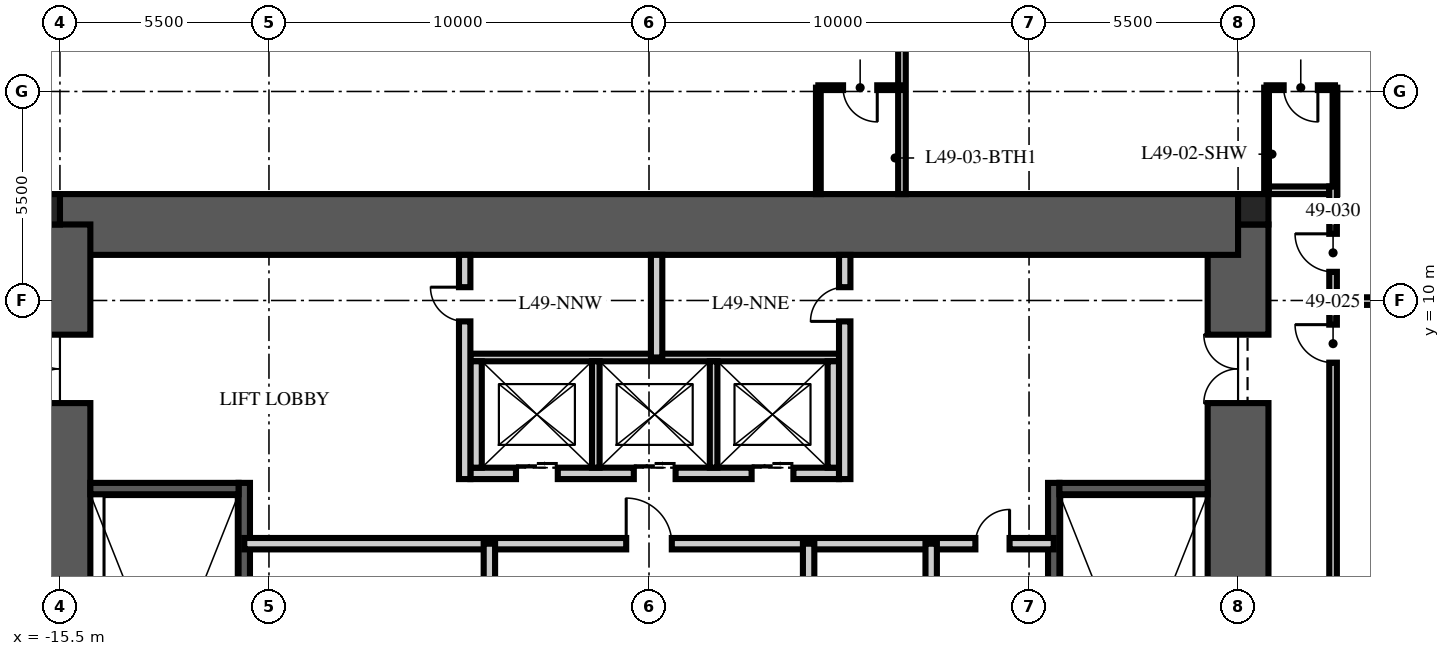
"""IFC4 building model, lengths in metres.
Left out: names, types, materials, properties, quantities, classifications, styles, units other than length and angle.
Written with IfcOpenShell. Run it as: python <this file> out.ifc"""

import sys

from ifc_helpers import new_model, si_unit, direction, frame, frame_2d, origin, origin_2d, place, context, subcontext, project, spatial, rectangle, extrude, element, fill, save


model = new_model("IFC4")
c1 = context("Model", 3, precision=1e-05, world=origin(), true_north=direction((0.0, 1.0)))
c2 = subcontext(c1, "Body", "Model", "MODEL_VIEW")
j1 = project(units=[si_unit("LENGTHUNIT", "METRE"), si_unit("PLANEANGLEUNIT", "RADIAN")], contexts=[c1])
p1 = place(None, origin())
s1 = spatial("IfcSite", under=j1, at=p1, CompositionType="ELEMENT")
p2 = place(p1, origin())
s2 = spatial("IfcBuilding", under=s1, at=p2, CompositionType="ELEMENT")
p3 = place(p2, frame((0.0, 0.0, 199.5)))
s3 = spatial("IfcBuildingStorey", under=s2, at=p3, CompositionType="ELEMENT", Elevation=199.5)
p4 = place(p3, frame((15.5, -12.0, -0.25), z_axis=(0.0, 0.0, 1.0), x_axis=(0.0, 1.0, 0.0)))
e1 = element("IfcWall", 1, at=p4, inside=s3, PredefinedType="SHEAR", context=c2, shape_type="SweptSolid", body=[
    extrude(rectangle(XDim=24.0, YDim=1.6, at=frame_2d((12.0, 0.0))), origin(), (0.0, 0.0, 1.0), 3.75),
])
p5 = place(p4, frame((3.2, 0.0, 0.25)))
e2 = element("IfcOpeningElement", 2, at=p5, cuts=e1, PredefinedType="OPENING", context=c2, shape_type="SweptSolid", body=[
    extrude(rectangle(XDim=1.2, YDim=2.1, at=frame_2d((0.6, 1.05))), frame((0.0, 0.81, 0.0), z_axis=(0.0, -1.0, 0.0), x_axis=(1.0, 0.0, 0.0)), (0.0, 0.0, 1.0), 1.62),
])
p6 = place(p4, frame((19.3, 0.0, 0.25)))
e3 = element("IfcOpeningElement", 3, at=p6, cuts=e1, PredefinedType="OPENING", context=c2, shape_type="SweptSolid", body=[
    extrude(rectangle(XDim=1.8, YDim=2.1, at=frame_2d((0.9, 1.05))), frame((0.0, 0.81, 0.0), z_axis=(0.0, -1.0, 0.0), x_axis=(1.0, 0.0, 0.0)), (0.0, 0.0, 1.0), 1.62),
])
p7 = place(p3, frame((-15.5, 12.0, -0.25), z_axis=(0.0, 0.0, 1.0), x_axis=(1.0, 0.0, 0.0)))
e4 = element("IfcWall", 4, at=p7, inside=s3, PredefinedType="SHEAR", context=c2, shape_type="SweptSolid", body=[
    extrude(rectangle(XDim=31.0, YDim=1.6, at=frame_2d((15.5, 0.0))), origin(), (0.0, 0.0, 1.0), 3.75),
])
p8 = place(p3, frame((-15.5, -12.0, -0.25), z_axis=(0.0, 0.0, 1.0), x_axis=(0.0, 1.0, 0.0)))
e5 = element("IfcWall", 5, at=p8, inside=s3, PredefinedType="SHEAR", context=c2, shape_type="SweptSolid", body=[
    extrude(rectangle(XDim=24.0, YDim=1.6, at=frame_2d((12.0, 0.0))), origin(), (0.0, 0.0, 1.0), 3.75),
])
p9 = place(p8, frame((3.2, 0.0, 0.25)))
e6 = element("IfcOpeningElement", 6, at=p9, cuts=e5, PredefinedType="OPENING", context=c2, shape_type="SweptSolid", body=[
    extrude(rectangle(XDim=1.2, YDim=2.1, at=frame_2d((0.6, 1.05))), frame((0.0, 0.81, 0.0), z_axis=(0.0, -1.0, 0.0), x_axis=(1.0, 0.0, 0.0)), (0.0, 0.0, 1.0), 1.62),
])
p10 = place(p8, frame((19.3, 0.0, 0.25)))
e7 = element("IfcOpeningElement", 7, at=p10, cuts=e5, PredefinedType="OPENING", context=c2, shape_type="SweptSolid", body=[
    extrude(rectangle(XDim=1.8, YDim=2.1, at=frame_2d((0.9, 1.05))), frame((0.0, 0.81, 0.0), z_axis=(0.0, -1.0, 0.0), x_axis=(1.0, 0.0, 0.0)), (0.0, 0.0, 1.0), 1.62),
])
for number, where, z_axis, x_axis in (
    (8, (15.9, 12.4, -0.25), (0.0, 0.0, 1.0), (1.0, 0.0, 0.0)),
    (9, (-15.9, 12.4, -0.25), (0.0, 0.0, 1.0), (1.0, 0.0, 0.0)),
):
    element("IfcColumn", number, at=place(p3, frame(where, z_axis=z_axis, x_axis=x_axis)), inside=s3, PredefinedType="COLUMN", context=c2, shape_type="SweptSolid", body=[
        extrude(rectangle(XDim=0.8, YDim=0.8, at=origin_2d()), origin(), (0.0, 0.0, 1.0), 3.75),
    ])
p11 = place(p3, frame((-10.65, -4.9, 0.0), z_axis=(0.0, 0.0, 1.0), x_axis=(0.0, 1.0, 0.0)))
e10 = element("IfcWall", 10, at=p11, inside=s3, PredefinedType="SOLIDWALL", context=c2, shape_type="SweptSolid", body=[
    extrude(rectangle(XDim=10.1, YDim=0.3, at=frame_2d((5.05, 0.0))), origin(), (0.0, 0.0, 1.0), 3.5),
])
p12 = place(p3, frame((-14.7, 5.05, 0.0), z_axis=(0.0, 0.0, 1.0), x_axis=(1.0, 0.0, 0.0)))
e11 = element("IfcWall", 11, at=p12, inside=s3, PredefinedType="SOLIDWALL", context=c2, shape_type="SweptSolid", body=[
    extrude(rectangle(XDim=3.9, YDim=0.3, at=frame_2d((1.95, 0.0))), origin(), (0.0, 0.0, 1.0), 3.5),
])
p13 = place(p3, frame((10.65, -4.9, 0.0), z_axis=(0.0, 0.0, 1.0), x_axis=(0.0, 1.0, 0.0)))
e12 = element("IfcWall", 12, at=p13, inside=s3, PredefinedType="SOLIDWALL", context=c2, shape_type="SweptSolid", body=[
    extrude(rectangle(XDim=10.1, YDim=0.3, at=frame_2d((5.05, 0.0))), origin(), (0.0, 0.0, 1.0), 3.5),
])
p14 = place(p3, frame((14.7, 5.05, 0.0), z_axis=(0.0, 0.0, 1.0), x_axis=(-1.0, 0.0, 0.0)))
e13 = element("IfcWall", 13, at=p14, inside=s3, PredefinedType="SOLIDWALL", context=c2, shape_type="SweptSolid", body=[
    extrude(rectangle(XDim=3.9, YDim=0.3, at=frame_2d((1.95, 0.0))), origin(), (0.0, 0.0, 1.0), 3.5),
])
p15 = place(p3, frame((-4.7, 5.45, 0.0), z_axis=(0.0, 0.0, 1.0), x_axis=(1.0, 0.0, 0.0)))
e14 = element("IfcWall", 14, at=p15, inside=s3, PredefinedType="PARTITIONING", context=c2, shape_type="SweptSolid", body=[
    extrude(rectangle(XDim=9.7, YDim=0.3, at=frame_2d((4.85, 0.0))), origin(), (0.0, 0.0, 1.0), 3.5),
])
p16 = place(p15, frame((1.2, 0.0, 0.0)))
e15 = element("IfcOpeningElement", 15, at=p16, cuts=e14, PredefinedType="OPENING", context=c2, shape_type="SweptSolid", body=[
    extrude(rectangle(XDim=1.1, YDim=2.1, at=frame_2d((0.55, 1.05))), frame((0.0, 0.16, 0.0), z_axis=(0.0, -1.0, 0.0), x_axis=(1.0, 0.0, 0.0)), (0.0, 0.0, 1.0), 0.32),
])
p17 = place(p15, frame((4.3, 0.0, 0.0)))
e16 = element("IfcOpeningElement", 16, at=p17, cuts=e14, PredefinedType="OPENING", context=c2, shape_type="SweptSolid", body=[
    extrude(rectangle(XDim=1.1, YDim=2.1, at=frame_2d((0.55, 1.05))), frame((0.0, 0.16, 0.0), z_axis=(0.0, -1.0, 0.0), x_axis=(1.0, 0.0, 0.0)), (0.0, 0.0, 1.0), 0.32),
])
p18 = place(p15, frame((7.4, 0.0, 0.0)))
e17 = element("IfcOpeningElement", 17, at=p18, cuts=e14, PredefinedType="OPENING", context=c2, shape_type="SweptSolid", body=[
    extrude(rectangle(XDim=1.1, YDim=2.1, at=frame_2d((0.55, 1.05))), frame((0.0, 0.16, 0.0), z_axis=(0.0, -1.0, 0.0), x_axis=(1.0, 0.0, 0.0)), (0.0, 0.0, 1.0), 0.32),
])
p19 = place(p3, frame((-4.7, 8.5, 0.0), z_axis=(0.0, 0.0, 1.0), x_axis=(1.0, 0.0, 0.0)))
e18 = element("IfcWall", 18, at=p19, inside=s3, PredefinedType="PARTITIONING", context=c2, shape_type="SweptSolid", body=[
    extrude(rectangle(XDim=9.7, YDim=0.2, at=frame_2d((4.85, 0.0))), origin(), (0.0, 0.0, 1.0), 3.5),
])
for number, where, z_axis, x_axis in (
    (19, (-4.55, 5.6, 0.0), (0.0, 0.0, 1.0), (0.0, 1.0, 0.0)),
    (20, (4.85, 5.6, 0.0), (0.0, 0.0, 1.0), (0.0, 1.0, 0.0)),
):
    element("IfcWall", number, at=place(p3, frame(where, z_axis=z_axis, x_axis=x_axis)), inside=s3, PredefinedType="PARTITIONING", context=c2, shape_type="SweptSolid", body=[
        extrude(rectangle(XDim=2.8, YDim=0.3, at=frame_2d((1.4, 0.0))), origin(), (0.0, 0.0, 1.0), 3.5),
    ])
for number, where, z_axis, x_axis in (
    (21, (-1.4, 5.6, 0.0), (0.0, 0.0, 1.0), (0.0, 1.0, 0.0)),
    (22, (1.7, 5.6, 0.0), (0.0, 0.0, 1.0), (0.0, 1.0, 0.0)),
):
    element("IfcWall", number, at=place(p3, frame(where, z_axis=z_axis, x_axis=x_axis)), inside=s3, PredefinedType="PARTITIONING", context=c2, shape_type="SweptSolid", body=[
        extrude(rectangle(XDim=2.8, YDim=0.2, at=frame_2d((1.4, 0.0))), origin(), (0.0, 0.0, 1.0), 3.5),
    ])
p20 = place(p3, frame((-10.65, 3.6, 0.0), z_axis=(0.0, 0.0, 1.0), x_axis=(1.0, 0.0, 0.0)))
e23 = element("IfcWall", 23, at=p20, inside=s3, PredefinedType="PARTITIONING", context=c2, shape_type="SweptSolid", body=[
    extrude(rectangle(XDim=21.3, YDim=0.3, at=frame_2d((10.65, 0.0))), origin(), (0.0, 0.0, 1.0), 3.5),
])
p21 = place(p20, frame((10.05, 0.0, 0.0)))
e24 = element("IfcOpeningElement", 24, at=p21, cuts=e23, PredefinedType="OPENING", context=c2, shape_type="SweptSolid", body=[
    extrude(rectangle(XDim=1.2, YDim=2.1, at=frame_2d((0.6, 1.05))), frame((0.0, 0.16, 0.0), z_axis=(0.0, -1.0, 0.0), x_axis=(1.0, 0.0, 0.0)), (0.0, 0.0, 1.0), 0.32),
])
p22 = place(p20, frame((19.238, 0.0, 0.0)))
e25 = element("IfcOpeningElement", 25, at=p22, cuts=e23, PredefinedType="OPENING", context=c2, shape_type="SweptSolid", body=[
    extrude(rectangle(XDim=0.9, YDim=2.1, at=frame_2d((0.45, 1.05))), frame((0.0, 0.16, 0.0), z_axis=(0.0, -1.0, 0.0), x_axis=(1.0, 0.0, 0.0)), (0.0, 0.0, 1.0), 0.32),
])
p23 = place(p3, frame((-4.2, -6.65, 0.0), z_axis=(0.0, 0.0, 1.0), x_axis=(0.0, 1.0, 0.0)))
e26 = element("IfcWall", 26, at=p23, inside=s3, PredefinedType="PARTITIONING", context=c2, shape_type="SweptSolid", body=[
    extrude(rectangle(XDim=10.25, YDim=0.3, at=frame_2d((5.125, 0.0))), origin(), (0.0, 0.0, 1.0), 3.5),
])
p24 = place(p23, frame((0.787, 0.0, 0.0)))
e27 = element("IfcOpeningElement", 27, at=p24, cuts=e26, PredefinedType="OPENING", context=c2, shape_type="SweptSolid", body=[
    extrude(rectangle(XDim=0.9, YDim=2.1, at=frame_2d((0.45, 1.05))), frame((0.0, 0.16, 0.0), z_axis=(0.0, -1.0, 0.0), x_axis=(1.0, 0.0, 0.0)), (0.0, 0.0, 1.0), 0.32),
])
p25 = place(p23, frame((5.912, 0.0, 0.0)))
e28 = element("IfcOpeningElement", 28, at=p25, cuts=e26, PredefinedType="OPENING", context=c2, shape_type="SweptSolid", body=[
    extrude(rectangle(XDim=0.9, YDim=2.1, at=frame_2d((0.45, 1.05))), frame((0.0, 0.16, 0.0), z_axis=(0.0, -1.0, 0.0), x_axis=(1.0, 0.0, 0.0)), (0.0, 0.0, 1.0), 0.32),
])
p26 = place(p3, frame((4.2, -6.65, 0.0), z_axis=(0.0, 0.0, 1.0), x_axis=(0.0, 1.0, 0.0)))
e29 = element("IfcWall", 29, at=p26, inside=s3, PredefinedType="PARTITIONING", context=c2, shape_type="SweptSolid", body=[
    extrude(rectangle(XDim=10.25, YDim=0.3, at=frame_2d((5.125, 0.0))), origin(), (0.0, 0.0, 1.0), 3.5),
])
p27 = place(p26, frame((2.15, 0.0, 0.0)))
e30 = element("IfcOpeningElement", 30, at=p27, cuts=e29, PredefinedType="OPENING", context=c2, shape_type="SweptSolid", body=[
    extrude(rectangle(XDim=0.9, YDim=2.1, at=frame_2d((0.45, 1.05))), frame((0.0, 0.16, 0.0), z_axis=(0.0, -1.0, 0.0), x_axis=(1.0, 0.0, 0.0)), (0.0, 0.0, 1.0), 0.32),
])
p28 = place(p26, frame((7.275, 0.0, 0.0)))
e31 = element("IfcOpeningElement", 31, at=p28, cuts=e29, PredefinedType="OPENING", context=c2, shape_type="SweptSolid", body=[
    extrude(rectangle(XDim=0.9, YDim=2.1, at=frame_2d((0.45, 1.05))), frame((0.0, 0.16, 0.0), z_axis=(0.0, -1.0, 0.0), x_axis=(1.0, 0.0, 0.0)), (0.0, 0.0, 1.0), 0.32),
])
p29 = place(p3, frame((7.425, -1.45, 0.0), z_axis=(0.0, 0.0, 1.0), x_axis=(0.0, 1.0, 0.0)))
e32 = element("IfcWall", 32, at=p29, inside=s3, PredefinedType="PARTITIONING", context=c2, shape_type="SweptSolid", body=[
    extrude(rectangle(XDim=5.05, YDim=0.3, at=frame_2d((2.525, 0.0))), origin(), (0.0, 0.0, 1.0), 3.5),
])
p30 = place(p3, frame((-4.85, 5.3, 0.0), z_axis=(0.0, 0.0, 1.0), x_axis=(0.0, 1.0, 0.0)))
e33 = element("IfcWall", 33, at=p30, inside=s3, PredefinedType="PARTITIONING", context=c2, shape_type="SweptSolid", body=[
    extrude(rectangle(XDim=5.9, YDim=0.3, at=frame_2d((2.95, 0.0))), origin(), (0.0, 0.0, 1.0), 3.5),
])
p31 = place(p30, frame((4.15, 0.0, 0.0)))
e34 = element("IfcOpeningElement", 34, at=p31, cuts=e33, PredefinedType="OPENING", context=c2, shape_type="SweptSolid", body=[
    extrude(rectangle(XDim=0.9, YDim=2.1, at=frame_2d((0.45, 1.05))), frame((0.0, 0.16, 0.0), z_axis=(0.0, -1.0, 0.0), x_axis=(1.0, 0.0, 0.0)), (0.0, 0.0, 1.0), 0.32),
])
p32 = place(p3, frame((5.15, 5.3, 0.0), z_axis=(0.0, 0.0, 1.0), x_axis=(0.0, 1.0, 0.0)))
e35 = element("IfcWall", 35, at=p32, inside=s3, PredefinedType="PARTITIONING", context=c2, shape_type="SweptSolid", body=[
    extrude(rectangle(XDim=5.9, YDim=0.3, at=frame_2d((2.95, 0.0))), origin(), (0.0, 0.0, 1.0), 3.5),
])
p33 = place(p32, frame((4.15, 0.0, 0.0)))
e36 = element("IfcOpeningElement", 36, at=p33, cuts=e35, PredefinedType="OPENING", context=c2, shape_type="SweptSolid", body=[
    extrude(rectangle(XDim=0.9, YDim=2.1, at=frame_2d((0.45, 1.05))), frame((0.0, 0.16, 0.0), z_axis=(0.0, -1.0, 0.0), x_axis=(1.0, 0.0, 0.0)), (0.0, 0.0, 1.0), 0.32),
])
p34 = place(p3, frame((0.2, 8.5, 0.0), z_axis=(0.0, 0.0, 1.0), x_axis=(0.0, 1.0, 0.0)))
e37 = element("IfcWall", 37, at=p34, inside=s3, PredefinedType="PARTITIONING", context=c2, shape_type="SweptSolid", body=[
    extrude(rectangle(XDim=2.7, YDim=0.3, at=frame_2d((1.35, 0.0))), origin(), (0.0, 0.0, 1.0), 3.5),
])
p35 = place(p3, frame((16.3, 12.9, 0.0), z_axis=(0.0, 0.0, 1.0), x_axis=(1.0, 0.0, 0.0)))
e38 = element("IfcWall", 38, at=p35, inside=s3, PredefinedType="PARTITIONING", context=c2, shape_type="SweptSolid", body=[
    extrude(rectangle(XDim=1.6, YDim=0.2, at=frame_2d((0.8, 0.0))), origin(), (0.0, 0.0, 1.0), 2.3),
])
p36 = place(p3, frame((18.1, 9.984, 0.0), z_axis=(0.0, 0.0, 1.0), x_axis=(1.0, 0.0, 0.0)))
e39 = element("IfcWall", 39, at=p36, inside=s3, PredefinedType="PARTITIONING", context=c2, shape_type="SweptSolid", body=[
    extrude(rectangle(XDim=8.35, YDim=0.2, at=frame_2d((4.175, 0.0))), origin(), (0.0, 0.0, 1.0), 2.91),
])
p37 = place(p3, frame((6.656, 12.8, 0.0), z_axis=(0.0, 0.0, 1.0), x_axis=(0.0, 1.0, 0.0)))
e40 = element("IfcWall", 40, at=p37, inside=s3, PredefinedType="PARTITIONING", context=c2, shape_type="SweptSolid", body=[
    extrude(rectangle(XDim=13.65, YDim=0.2, at=frame_2d((6.825, 0.0))), origin(), (0.0, 0.0, 1.0), 2.91),
])
p38 = place(p3, frame((18.05, 15.6, 0.0), z_axis=(0.0, 0.0, 1.0), x_axis=(-1.0, 0.0, 0.0)))
e41 = element("IfcWall", 41, at=p38, inside=s3, PredefinedType="PARTITIONING", context=c2, shape_type="SweptSolid", body=[
    extrude(rectangle(XDim=1.8, YDim=0.125, at=frame_2d((0.9, 0.0))), origin(), (0.0, 0.0, 1.0), 2.3),
])
p39 = place(p38, frame((0.45, 0.0, 0.0)))
e42 = element("IfcOpeningElement", 42, at=p39, cuts=e41, PredefinedType="OPENING", context=c2, shape_type="SweptSolid", body=[
    extrude(rectangle(XDim=0.9, YDim=2.1, at=frame_2d((0.45, 1.05))), frame((0.0, 0.073, 0.0), z_axis=(0.0, -1.0, 0.0), x_axis=(1.0, 0.0, 0.0)), (0.0, 0.0, 1.0), 0.145),
])
for number, where, z_axis, x_axis in (
    (43, (18.05, 12.8, 0.0), (0.0, 0.0, 1.0), (0.0, 1.0, 0.0)),
    (44, (16.25, 12.8, 0.0), (0.0, 0.0, 1.0), (0.0, 1.0, 0.0)),
):
    element("IfcWall", number, at=place(p3, frame(where, z_axis=z_axis, x_axis=x_axis)), inside=s3, PredefinedType="PARTITIONING", context=c2, shape_type="SweptSolid", body=[
        extrude(rectangle(XDim=2.8, YDim=0.125, at=frame_2d((1.4, 0.0))), origin(), (0.0, 0.0, 1.0), 2.3),
    ])
p40 = place(p3, frame((6.656, 15.6, 0.0), z_axis=(0.0, 0.0, 1.0), x_axis=(-1.0, 0.0, 0.0)))
e45 = element("IfcWall", 45, at=p40, inside=s3, PredefinedType="PARTITIONING", context=c2, shape_type="SweptSolid", body=[
    extrude(rectangle(XDim=2.2, YDim=0.125, at=frame_2d((1.1, 0.0))), origin(), (0.0, 0.0, 1.0), 3.5),
])
p41 = place(p40, frame((0.65, 0.0, 0.0)))
e46 = element("IfcOpeningElement", 46, at=p41, cuts=e45, PredefinedType="OPENING", context=c2, shape_type="SweptSolid", body=[
    extrude(rectangle(XDim=0.9, YDim=2.1, at=frame_2d((0.45, 1.05))), frame((0.0, 0.073, 0.0), z_axis=(0.0, -1.0, 0.0), x_axis=(1.0, 0.0, 0.0)), (0.0, 0.0, 1.0), 0.145),
])
p42 = place(p3, frame((4.456, 12.8, 0.0), z_axis=(0.0, 0.0, 1.0), x_axis=(0.0, 1.0, 0.0)))
e47 = element("IfcWall", 47, at=p42, inside=s3, PredefinedType="PARTITIONING", context=c2, shape_type="SweptSolid", body=[
    extrude(rectangle(XDim=2.8, YDim=0.125, at=frame_2d((1.4, 0.0))), origin(), (0.0, 0.0, 1.0), 3.5),
])
p43 = place(p3, frame((18.0, -13.0, 0.0), z_axis=(0.0, 0.0, 1.0), x_axis=(0.0, 1.0, 0.0)))
e48 = element("IfcWall", 48, at=p43, inside=s3, PredefinedType="PARTITIONING", context=c2, shape_type="SweptSolid", body=[
    extrude(rectangle(XDim=26.0, YDim=0.2, at=frame_2d((13.0, 0.0))), origin(), (0.0, 0.0, 1.0), 2.6),
])
p44 = place(p43, frame((21.364, 0.0, 0.0)))
e49 = element("IfcOpeningElement", 49, at=p44, cuts=e48, PredefinedType="OPENING", context=c2, shape_type="SweptSolid", body=[
    extrude(rectangle(XDim=1.0, YDim=2.2, at=frame_2d((0.5, 1.1))), frame((0.0, 0.11, 0.0), z_axis=(0.0, -1.0, 0.0), x_axis=(1.0, 0.0, 0.0)), (0.0, 0.0, 1.0), 0.22),
])
p45 = place(p43, frame((23.754, 0.0, 0.0)))
e50 = element("IfcOpeningElement", 50, at=p45, cuts=e48, PredefinedType="OPENING", context=c2, shape_type="SweptSolid", body=[
    extrude(rectangle(XDim=1.0, YDim=2.2, at=frame_2d((0.5, 1.1))), frame((0.0, 0.11, 0.0), z_axis=(0.0, -1.0, 0.0), x_axis=(1.0, 0.0, 0.0)), (0.0, 0.0, 1.0), 0.22),
])
p46 = place(p43, frame((4.6, 0.0, 0.0)))
e51 = element("IfcOpeningElement", 51, at=p46, cuts=e48, PredefinedType="OPENING", context=c2, shape_type="SweptSolid", body=[
    extrude(rectangle(XDim=1.0, YDim=2.2, at=frame_2d((0.5, 1.1))), frame((0.0, 0.11, 0.0), z_axis=(0.0, -1.0, 0.0), x_axis=(1.0, 0.0, 0.0)), (0.0, 0.0, 1.0), 0.22),
])
p47 = place(p10, origin())
e52 = element("IfcDoor", 52, at=p47, inside=s3, OperationType="DOUBLE_DOOR_SINGLE_SWING", PredefinedType="DOOR", context=c2, shape_type="SweptSolid", body=[
    extrude(rectangle(XDim=1.8, YDim=2.1, at=frame_2d((0.9, 1.05))), frame((0.0, 0.025, 0.0), z_axis=(0.0, -1.0, 0.0), x_axis=(1.0, 0.0, 0.0)), (0.0, 0.0, 1.0), 0.05),
])
fill(e7, e52)
p48 = place(p6, origin())
e53 = element("IfcDoor", 53, at=p48, inside=s3, OperationType="DOUBLE_DOOR_SINGLE_SWING", PredefinedType="DOOR", context=c2, shape_type="SweptSolid", body=[
    extrude(rectangle(XDim=1.8, YDim=2.1, at=frame_2d((0.9, 1.05))), frame((0.0, 0.025, 0.0), z_axis=(0.0, -1.0, 0.0), x_axis=(1.0, 0.0, 0.0)), (0.0, 0.0, 1.0), 0.05),
])
fill(e3, e53)
p49 = place(p16, origin())
e54 = element("IfcDoor", 54, at=p49, inside=s3, OperationType="DOUBLE_DOOR_SLIDING", PredefinedType="DOOR", context=c2, shape_type="SweptSolid", body=[
    extrude(rectangle(XDim=1.1, YDim=2.1, at=frame_2d((0.55, 1.05))), frame((0.0, 0.025, 0.0), z_axis=(0.0, -1.0, 0.0), x_axis=(1.0, 0.0, 0.0)), (0.0, 0.0, 1.0), 0.05),
])
fill(e15, e54)
p50 = place(p17, origin())
e55 = element("IfcDoor", 55, at=p50, inside=s3, OperationType="DOUBLE_DOOR_SLIDING", PredefinedType="DOOR", context=c2, shape_type="SweptSolid", body=[
    extrude(rectangle(XDim=1.1, YDim=2.1, at=frame_2d((0.55, 1.05))), frame((0.0, 0.025, 0.0), z_axis=(0.0, -1.0, 0.0), x_axis=(1.0, 0.0, 0.0)), (0.0, 0.0, 1.0), 0.05),
])
fill(e16, e55)
p51 = place(p18, origin())
e56 = element("IfcDoor", 56, at=p51, inside=s3, OperationType="DOUBLE_DOOR_SLIDING", PredefinedType="DOOR", context=c2, shape_type="SweptSolid", body=[
    extrude(rectangle(XDim=1.1, YDim=2.1, at=frame_2d((0.55, 1.05))), frame((0.0, 0.025, 0.0), z_axis=(0.0, -1.0, 0.0), x_axis=(1.0, 0.0, 0.0)), (0.0, 0.0, 1.0), 0.05),
])
fill(e17, e56)
p52 = place(p21, origin())
e57 = element("IfcDoor", 57, at=p52, inside=s3, OperationType="SINGLE_SWING_LEFT", PredefinedType="DOOR", context=c2, shape_type="SweptSolid", body=[
    extrude(rectangle(XDim=1.2, YDim=2.1, at=frame_2d((0.6, 1.05))), frame((0.0, 0.025, 0.0), z_axis=(0.0, -1.0, 0.0), x_axis=(1.0, 0.0, 0.0)), (0.0, 0.0, 1.0), 0.05),
])
fill(e24, e57)
p53 = place(p22, origin())
e58 = element("IfcDoor", 58, at=p53, inside=s3, OperationType="SINGLE_SWING_RIGHT", PredefinedType="DOOR", context=c2, shape_type="SweptSolid", body=[
    extrude(rectangle(XDim=0.9, YDim=2.1, at=frame_2d((0.45, 1.05))), frame((0.0, 0.025, 0.0), z_axis=(0.0, -1.0, 0.0), x_axis=(1.0, 0.0, 0.0)), (0.0, 0.0, 1.0), 0.05),
])
fill(e25, e58)
p54 = place(p31, origin())
e59 = element("IfcDoor", 59, at=p54, inside=s3, OperationType="SINGLE_SWING_RIGHT", PredefinedType="DOOR", context=c2, shape_type="SweptSolid", body=[
    extrude(rectangle(XDim=0.9, YDim=2.1, at=frame_2d((0.45, 1.05))), frame((0.0, 0.025, 0.0), z_axis=(0.0, -1.0, 0.0), x_axis=(1.0, 0.0, 0.0)), (0.0, 0.0, 1.0), 0.05),
])
fill(e34, e59)
p55 = place(p33, origin())
e60 = element("IfcDoor", 60, at=p55, inside=s3, OperationType="SINGLE_SWING_LEFT", PredefinedType="DOOR", context=c2, shape_type="SweptSolid", body=[
    extrude(rectangle(XDim=0.9, YDim=2.1, at=frame_2d((0.45, 1.05))), frame((0.0, 0.025, 0.0), z_axis=(0.0, -1.0, 0.0), x_axis=(1.0, 0.0, 0.0)), (0.0, 0.0, 1.0), 0.05),
])
fill(e36, e60)
p56 = place(p44, origin())
e61 = element("IfcDoor", 61, at=p56, inside=s3, OperationType="SINGLE_SWING_RIGHT", PredefinedType="DOOR", context=c2, shape_type="SweptSolid", body=[
    extrude(rectangle(XDim=1.0, YDim=2.2, at=frame_2d((0.5, 1.1))), frame((0.0, 0.025, 0.0), z_axis=(0.0, -1.0, 0.0), x_axis=(1.0, 0.0, 0.0)), (0.0, 0.0, 1.0), 0.05),
])
fill(e49, e61)
p57 = place(p39, origin())
e62 = element("IfcDoor", 62, at=p57, inside=s3, OperationType="SINGLE_SWING_LEFT", PredefinedType="DOOR", context=c2, shape_type="SweptSolid", body=[
    extrude(rectangle(XDim=0.9, YDim=2.1, at=frame_2d((0.45, 1.05))), frame((0.0, 0.025, 0.0), z_axis=(0.0, -1.0, 0.0), x_axis=(1.0, 0.0, 0.0)), (0.0, 0.0, 1.0), 0.05),
])
fill(e42, e62)
p58 = place(p45, origin())
e63 = element("IfcDoor", 63, at=p58, inside=s3, OperationType="SINGLE_SWING_RIGHT", PredefinedType="DOOR", context=c2, shape_type="SweptSolid", body=[
    extrude(rectangle(XDim=1.0, YDim=2.2, at=frame_2d((0.5, 1.1))), frame((0.0, 0.025, 0.0), z_axis=(0.0, -1.0, 0.0), x_axis=(1.0, 0.0, 0.0)), (0.0, 0.0, 1.0), 0.05),
])
fill(e50, e63)
p59 = place(p41, origin())
e64 = element("IfcDoor", 64, at=p59, inside=s3, OperationType="SINGLE_SWING_LEFT", PredefinedType="DOOR", context=c2, shape_type="SweptSolid", body=[
    extrude(rectangle(XDim=0.9, YDim=2.1, at=frame_2d((0.45, 1.05))), frame((0.0, 0.025, 0.0), z_axis=(0.0, -1.0, 0.0), x_axis=(1.0, 0.0, 0.0)), (0.0, 0.0, 1.0), 0.05),
])
fill(e46, e64)
save(model, sys.argv[1])
